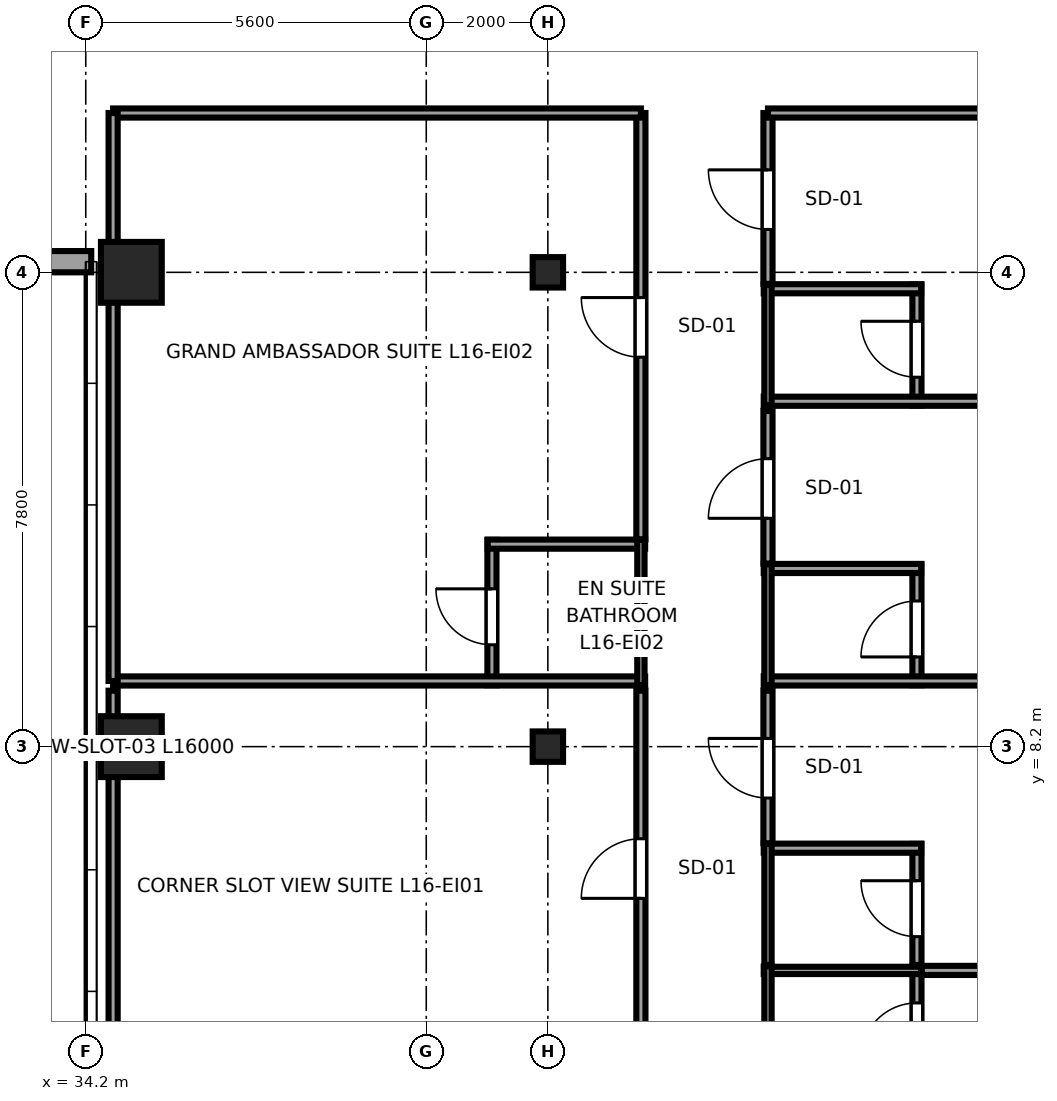
"""IFC4 building model, lengths in metres.
Left out: names, types, materials, properties, quantities, classifications, styles, units other than length and angle.
Written with IfcOpenShell. Run it as: python <this file> out.ifc"""

import sys

from ifc_helpers import new_model, si_unit, direction, frame, frame_2d, origin, origin_2d, place, context, subcontext, project, spatial, rectangle, i_section, extrude, source, transform, mapped, element, fill, save


model = new_model("IFC4")
c1 = context("Model", 3, precision=1e-05, world=origin(), true_north=direction((0.0, 1.0)))
c2 = subcontext(c1, "Body", "Model", "MODEL_VIEW")
j1 = project(units=[si_unit("LENGTHUNIT", "METRE"), si_unit("PLANEANGLEUNIT", "RADIAN")], contexts=[c1])
p1 = place(None, origin())
s1 = spatial("IfcSite", under=j1, at=p1, CompositionType="ELEMENT")
p2 = place(p1, origin())
s2 = spatial("IfcBuilding", under=s1, at=p2, CompositionType="ELEMENT")
p3 = place(p2, frame((0.0, 0.0, 67.5)))
s3 = spatial("IfcBuildingStorey", under=s2, at=p3, CompositionType="ELEMENT", Elevation=67.5)
m1 = source(origin(), c2, "Body", "SweptSolid", [
    extrude(rectangle(XDim=1.0, YDim=1.0, at=origin_2d()), origin(), (0.0, 0.0, 1.0), 3.55),
])
for number, where, z_axis, x_axis in (
    (1, (34.95, 8.2, 0.0), (0.0, 0.0, 1.0), (1.0, 0.0, 0.0)),
    (2, (34.95, 16.0, 0.0), (0.0, 0.0, 1.0), (1.0, 0.0, 0.0)),
):
    element("IfcColumn", number, at=place(p3, frame(where, z_axis=z_axis, x_axis=x_axis)), inside=s3, PredefinedType="COLUMN", context=c2, shape_type="MappedRepresentation", body=[
        mapped(m1, transform((0.0, 0.0, 0.0), x_axis=(1.0, 0.0, 0.0), y_axis=(0.0, 1.0, 0.0), z_axis=(0.0, 0.0, 1.0), scale=1.0)),
    ])
m2 = source(origin(), c2, "Body", "SweptSolid", [
    extrude(i_section(OverallWidth=0.5, OverallDepth=0.5, WebThickness=0.028, FlangeThickness=0.045, at=origin_2d()), origin(), (0.0, 0.0, 1.0), 3.55),
])
for number, where, z_axis, x_axis in (
    (3, (41.8, 8.2, 0.0), (0.0, 0.0, 1.0), (1.0, 0.0, 0.0)),
    (4, (41.8, 16.0, 0.0), (0.0, 0.0, 1.0), (1.0, 0.0, 0.0)),
):
    element("IfcColumn", number, at=place(p3, frame(where, z_axis=z_axis, x_axis=x_axis)), inside=s3, PredefinedType="COLUMN", context=c2, shape_type="MappedRepresentation", body=[
        mapped(m2, transform((0.0, 0.0, 0.0), x_axis=(1.0, 0.0, 0.0), y_axis=(0.0, 1.0, 0.0), z_axis=(0.0, 0.0, 1.0), scale=1.0)),
    ])
p4 = place(p3, frame((22.71, 16.175, 0.0), z_axis=(0.0, 0.0, 1.0), x_axis=(1.0, 0.0, 0.0)))
e5 = element("IfcWall", 5, at=p4, inside=s3, PredefinedType="SOLIDWALL", context=c2, shape_type="SweptSolid", body=[
    extrude(rectangle(XDim=11.58, YDim=0.35, at=frame_2d((5.79, 0.0))), origin(), (0.0, 0.0, 1.0), 2.748),
])
p5 = place(p4, frame((2.22, 0.0, 0.68)))
e6 = element("IfcOpeningElement", 6, at=p5, cuts=e5, PredefinedType="OPENING", context=c2, shape_type="SweptSolid", body=[
    extrude(rectangle(XDim=1.95, YDim=1.82, at=frame_2d((0.975, 0.91))), frame((0.0, 0.185, 0.0), z_axis=(0.0, -1.0, 0.0), x_axis=(1.0, 0.0, 0.0)), (0.0, 0.0, 1.0), 0.37),
])
p6 = place(p4, frame((7.41, 0.0, 0.68)))
e7 = element("IfcOpeningElement", 7, at=p6, cuts=e5, PredefinedType="OPENING", context=c2, shape_type="SweptSolid", body=[
    extrude(rectangle(XDim=1.95, YDim=1.82, at=frame_2d((0.975, 0.91))), frame((0.0, 0.185, 0.0), z_axis=(0.0, -1.0, 0.0), x_axis=(1.0, 0.0, 0.0)), (0.0, 0.0, 1.0), 0.37),
])
p7 = place(p3, frame((40.88, 9.21, 0.0), z_axis=(0.0, 0.0, 1.0), x_axis=(0.0, 1.0, 0.0)))
e8 = element("IfcWall", 8, at=p7, inside=s3, PredefinedType="PARTITIONING", context=c2, shape_type="SweptSolid", body=[
    extrude(rectangle(XDim=2.39, YDim=0.15, at=frame_2d((1.195, 0.0))), origin(), (0.0, 0.0, 1.0), 3.37),
])
p8 = place(p7, frame((0.665, 0.0, 0.0)))
e9 = element("IfcOpeningElement", 9, at=p8, cuts=e8, PredefinedType="OPENING", context=c2, shape_type="SweptSolid", body=[
    extrude(rectangle(XDim=0.92, YDim=2.01, at=frame_2d((0.46, 1.005))), frame((0.0, 0.085, 0.0), z_axis=(0.0, -1.0, 0.0), x_axis=(1.0, 0.0, 0.0)), (0.0, 0.0, 1.0), 0.17),
])
p9 = place(p3, frame((34.65, 9.28, 0.0), z_axis=(0.0, 0.0, 1.0), x_axis=(1.0, 0.0, 0.0)))
e10 = element("IfcWall", 10, at=p9, inside=s3, PredefinedType="PARTITIONING", context=c2, shape_type="SweptSolid", body=[
    extrude(rectangle(XDim=8.75, YDim=0.15, at=frame_2d((4.375, 0.0))), origin(), (0.0, 0.0, 1.0), 3.37),
])
p10 = place(p3, frame((40.81, 11.53, 0.0), z_axis=(0.0, 0.0, 1.0), x_axis=(1.0, 0.0, 0.0)))
e11 = element("IfcWall", 11, at=p10, inside=s3, PredefinedType="PARTITIONING", context=c2, shape_type="SweptSolid", body=[
    extrude(rectangle(XDim=2.59, YDim=0.15, at=frame_2d((1.295, 0.0))), origin(), (0.0, 0.0, 1.0), 3.37),
])
p11 = place(p3, frame((43.33, 9.21, 0.0), z_axis=(0.0, 0.0, 1.0), x_axis=(0.0, 1.0, 0.0)))
e12 = element("IfcWall", 12, at=p11, inside=s3, PredefinedType="PLUMBINGWALL", context=c2, shape_type="SweptSolid", body=[
    extrude(rectangle(XDim=2.39, YDim=0.12, at=frame_2d((1.195, 0.0))), origin(), (0.0, 0.0, 1.0), 3.37),
])
p12 = place(p3, frame((47.87, 2.6, 0.0), z_axis=(0.0, 0.0, 1.0), x_axis=(0.0, 1.0, 0.0)))
e13 = element("IfcWall", 13, at=p12, inside=s3, PredefinedType="PARTITIONING", context=c2, shape_type="SweptSolid", body=[
    extrude(rectangle(XDim=1.99, YDim=0.15, at=frame_2d((0.995, 0.0))), origin(), (0.0, 0.0, 1.0), 3.37),
])
p13 = place(p12, frame((0.465, 0.0, 0.0)))
e14 = element("IfcOpeningElement", 14, at=p13, cuts=e13, PredefinedType="OPENING", context=c2, shape_type="SweptSolid", body=[
    extrude(rectangle(XDim=0.92, YDim=2.01, at=frame_2d((0.46, 1.005))), frame((0.0, 0.085, 0.0), z_axis=(0.0, -1.0, 0.0), x_axis=(1.0, 0.0, 0.0)), (0.0, 0.0, 1.0), 0.17),
])
p14 = place(p3, frame((45.35, 4.52, 0.0), z_axis=(0.0, 0.0, 1.0), x_axis=(1.0, 0.0, 0.0)))
e15 = element("IfcWall", 15, at=p14, inside=s3, PredefinedType="PLUMBINGWALL", context=c2, shape_type="SweptSolid", body=[
    extrude(rectangle(XDim=2.59, YDim=0.12, at=frame_2d((1.295, 0.0))), origin(), (0.0, 0.0, 1.0), 3.37),
])
p15 = place(p3, frame((45.42, 2.6, 0.0), z_axis=(0.0, 0.0, 1.0), x_axis=(0.0, 1.0, 0.0)))
e16 = element("IfcWall", 16, at=p15, inside=s3, PredefinedType="PLUMBINGWALL", context=c2, shape_type="SweptSolid", body=[
    extrude(rectangle(XDim=1.99, YDim=0.12, at=frame_2d((0.995, 0.0))), origin(), (0.0, 0.0, 1.0), 3.37),
])
p16 = place(p3, frame((47.87, 4.61, 0.0), z_axis=(0.0, 0.0, 1.0), x_axis=(0.0, 1.0, 0.0)))
e17 = element("IfcWall", 17, at=p16, inside=s3, PredefinedType="PARTITIONING", context=c2, shape_type="SweptSolid", body=[
    extrude(rectangle(XDim=1.99, YDim=0.15, at=frame_2d((0.995, 0.0))), origin(), (0.0, 0.0, 1.0), 3.37),
])
p17 = place(p16, frame((0.465, 0.0, 0.0)))
e18 = element("IfcOpeningElement", 18, at=p17, cuts=e17, PredefinedType="OPENING", context=c2, shape_type="SweptSolid", body=[
    extrude(rectangle(XDim=0.92, YDim=2.01, at=frame_2d((0.46, 1.005))), frame((0.0, 0.085, 0.0), z_axis=(0.0, -1.0, 0.0), x_axis=(1.0, 0.0, 0.0)), (0.0, 0.0, 1.0), 0.17),
])
p18 = place(p3, frame((45.35, 6.53, 0.0), z_axis=(0.0, 0.0, 1.0), x_axis=(1.0, 0.0, 0.0)))
e19 = element("IfcWall", 19, at=p18, inside=s3, PredefinedType="PARTITIONING", context=c2, shape_type="SweptSolid", body=[
    extrude(rectangle(XDim=2.59, YDim=0.15, at=frame_2d((1.295, 0.0))), origin(), (0.0, 0.0, 1.0), 3.37),
])
p19 = place(p3, frame((45.42, 4.61, 0.0), z_axis=(0.0, 0.0, 1.0), x_axis=(0.0, 1.0, 0.0)))
e20 = element("IfcWall", 20, at=p19, inside=s3, PredefinedType="PLUMBINGWALL", context=c2, shape_type="SweptSolid", body=[
    extrude(rectangle(XDim=1.99, YDim=0.12, at=frame_2d((0.995, 0.0))), origin(), (0.0, 0.0, 1.0), 3.37),
])
p20 = place(p3, frame((47.87, 9.21, 0.0), z_axis=(0.0, 0.0, 1.0), x_axis=(0.0, 1.0, 0.0)))
e21 = element("IfcWall", 21, at=p20, inside=s3, PredefinedType="PARTITIONING", context=c2, shape_type="SweptSolid", body=[
    extrude(rectangle(XDim=1.99, YDim=0.15, at=frame_2d((0.995, 0.0))), origin(), (0.0, 0.0, 1.0), 3.37),
])
p21 = place(p20, frame((0.465, 0.0, 0.0)))
e22 = element("IfcOpeningElement", 22, at=p21, cuts=e21, PredefinedType="OPENING", context=c2, shape_type="SweptSolid", body=[
    extrude(rectangle(XDim=0.92, YDim=2.01, at=frame_2d((0.46, 1.005))), frame((0.0, 0.085, 0.0), z_axis=(0.0, -1.0, 0.0), x_axis=(1.0, 0.0, 0.0)), (0.0, 0.0, 1.0), 0.17),
])
p22 = place(p3, frame((45.35, 9.28, 0.0), z_axis=(0.0, 0.0, 1.0), x_axis=(1.0, 0.0, 0.0)))
e23 = element("IfcWall", 23, at=p22, inside=s3, PredefinedType="PARTITIONING", context=c2, shape_type="SweptSolid", body=[
    extrude(rectangle(XDim=11.245, YDim=0.15, at=frame_2d((5.623, 0.0))), origin(), (0.0, 0.0, 1.0), 3.37),
])
p23 = place(p3, frame((45.35, 11.13, 0.0), z_axis=(0.0, 0.0, 1.0), x_axis=(1.0, 0.0, 0.0)))
e24 = element("IfcWall", 24, at=p23, inside=s3, PredefinedType="PARTITIONING", context=c2, shape_type="SweptSolid", body=[
    extrude(rectangle(XDim=2.59, YDim=0.15, at=frame_2d((1.295, 0.0))), origin(), (0.0, 0.0, 1.0), 3.37),
])
p24 = place(p3, frame((45.42, 9.21, 0.0), z_axis=(0.0, 0.0, 1.0), x_axis=(0.0, 1.0, 0.0)))
e25 = element("IfcWall", 25, at=p24, inside=s3, PredefinedType="PLUMBINGWALL", context=c2, shape_type="SweptSolid", body=[
    extrude(rectangle(XDim=1.99, YDim=0.12, at=frame_2d((0.995, 0.0))), origin(), (0.0, 0.0, 1.0), 3.37),
])
p25 = place(p3, frame((47.87, 13.81, 0.0), z_axis=(0.0, 0.0, 1.0), x_axis=(0.0, 1.0, 0.0)))
e26 = element("IfcWall", 26, at=p25, inside=s3, PredefinedType="PARTITIONING", context=c2, shape_type="SweptSolid", body=[
    extrude(rectangle(XDim=1.99, YDim=0.15, at=frame_2d((0.995, 0.0))), origin(), (0.0, 0.0, 1.0), 3.37),
])
p26 = place(p25, frame((0.465, 0.0, 0.0)))
e27 = element("IfcOpeningElement", 27, at=p26, cuts=e26, PredefinedType="OPENING", context=c2, shape_type="SweptSolid", body=[
    extrude(rectangle(XDim=0.92, YDim=2.01, at=frame_2d((0.46, 1.005))), frame((0.0, 0.085, 0.0), z_axis=(0.0, -1.0, 0.0), x_axis=(1.0, 0.0, 0.0)), (0.0, 0.0, 1.0), 0.17),
])
p27 = place(p3, frame((45.35, 13.88, 0.0), z_axis=(0.0, 0.0, 1.0), x_axis=(1.0, 0.0, 0.0)))
e28 = element("IfcWall", 28, at=p27, inside=s3, PredefinedType="PARTITIONING", context=c2, shape_type="SweptSolid", body=[
    extrude(rectangle(XDim=11.245, YDim=0.15, at=frame_2d((5.623, 0.0))), origin(), (0.0, 0.0, 1.0), 3.37),
])
p28 = place(p3, frame((45.35, 15.73, 0.0), z_axis=(0.0, 0.0, 1.0), x_axis=(1.0, 0.0, 0.0)))
e29 = element("IfcWall", 29, at=p28, inside=s3, PredefinedType="PARTITIONING", context=c2, shape_type="SweptSolid", body=[
    extrude(rectangle(XDim=2.59, YDim=0.15, at=frame_2d((1.295, 0.0))), origin(), (0.0, 0.0, 1.0), 3.37),
])
p29 = place(p3, frame((45.42, 13.81, 0.0), z_axis=(0.0, 0.0, 1.0), x_axis=(0.0, 1.0, 0.0)))
e30 = element("IfcWall", 30, at=p29, inside=s3, PredefinedType="PLUMBINGWALL", context=c2, shape_type="SweptSolid", body=[
    extrude(rectangle(XDim=1.99, YDim=0.12, at=frame_2d((0.995, 0.0))), origin(), (0.0, 0.0, 1.0), 3.37),
])
p30 = place(p3, frame((43.33, 3.31, 0.0), z_axis=(0.0, 0.0, 1.0), x_axis=(0.0, 1.0, 0.0)))
e31 = element("IfcWall", 31, at=p30, inside=s3, PredefinedType="PARTITIONING", context=c2, shape_type="SweptSolid", body=[
    extrude(rectangle(XDim=5.81, YDim=0.15, at=frame_2d((2.905, 0.0))), origin(), (0.0, 0.0, 1.0), 3.37),
])
p31 = place(p30, frame((2.395, 0.0, 0.0)))
e32 = element("IfcOpeningElement", 32, at=p31, cuts=e31, PredefinedType="OPENING", context=c2, shape_type="SweptSolid", body=[
    extrude(rectangle(XDim=0.98, YDim=2.12, at=frame_2d((0.49, 1.06))), frame((0.0, 0.085, 0.0), z_axis=(0.0, -1.0, 0.0), x_axis=(1.0, 0.0, 0.0)), (0.0, 0.0, 1.0), 0.17),
])
p32 = place(p3, frame((34.65, 0.405, 0.0), z_axis=(0.0, 0.0, 1.0), x_axis=(0.0, 1.0, 0.0)))
e33 = element("IfcWall", 33, at=p32, inside=s3, PredefinedType="PARTITIONING", context=c2, shape_type="SweptSolid", body=[
    extrude(rectangle(XDim=8.715, YDim=0.15, at=frame_2d((4.357, 0.0))), origin(), (0.0, 0.0, 1.0), 3.37),
])
p33 = place(p3, frame((43.33, 11.61, 0.0), z_axis=(0.0, 0.0, 1.0), x_axis=(0.0, 1.0, 0.0)))
e34 = element("IfcWall", 34, at=p33, inside=s3, PredefinedType="PARTITIONING", context=c2, shape_type="SweptSolid", body=[
    extrude(rectangle(XDim=7.01, YDim=0.15, at=frame_2d((3.505, 0.0))), origin(), (0.0, 0.0, 1.0), 3.37),
])
p34 = place(p33, frame((2.995, 0.0, 0.0)))
e35 = element("IfcOpeningElement", 35, at=p34, cuts=e34, PredefinedType="OPENING", context=c2, shape_type="SweptSolid", body=[
    extrude(rectangle(XDim=0.98, YDim=2.12, at=frame_2d((0.49, 1.06))), frame((0.0, 0.085, 0.0), z_axis=(0.0, -1.0, 0.0), x_axis=(1.0, 0.0, 0.0)), (0.0, 0.0, 1.0), 0.17),
])
p35 = place(p3, frame((34.65, 18.62, 0.0), z_axis=(0.0, 0.0, 1.0), x_axis=(1.0, 0.0, 0.0)))
e36 = element("IfcWall", 36, at=p35, inside=s3, PredefinedType="PARTITIONING", context=c2, shape_type="SweptSolid", body=[
    extrude(rectangle(XDim=8.68, YDim=0.15, at=frame_2d((4.34, 0.0))), origin(), (0.0, 0.0, 1.0), 3.37),
])
p36 = place(p3, frame((34.65, 9.28, 0.0), z_axis=(0.0, 0.0, 1.0), x_axis=(0.0, 1.0, 0.0)))
e37 = element("IfcWall", 37, at=p36, inside=s3, PredefinedType="PARTITIONING", context=c2, shape_type="SweptSolid", body=[
    extrude(rectangle(XDim=9.34, YDim=0.15, at=frame_2d((4.67, 0.0))), origin(), (0.0, 0.0, 1.0), 3.37),
])
p37 = place(p3, frame((47.95, 4.52, 0.0), z_axis=(0.0, 0.0, 1.0), x_axis=(1.0, 0.0, 0.0)))
e38 = element("IfcWall", 38, at=p37, inside=s3, PredefinedType="PARTITIONING", context=c2, shape_type="SweptSolid", body=[
    extrude(rectangle(XDim=8.645, YDim=0.15, at=frame_2d((4.323, 0.0))), origin(), (0.0, 0.0, 1.0), 3.37),
])
p38 = place(p3, frame((45.42, 6.61, 0.0), z_axis=(0.0, 0.0, 1.0), x_axis=(0.0, 1.0, 0.0)))
e39 = element("IfcWall", 39, at=p38, inside=s3, PredefinedType="PARTITIONING", context=c2, shape_type="SweptSolid", body=[
    extrude(rectangle(XDim=2.51, YDim=0.15, at=frame_2d((1.255, 0.0))), origin(), (0.0, 0.0, 1.0), 3.37),
])
p39 = place(p38, frame((0.745, 0.0, 0.0)))
e40 = element("IfcOpeningElement", 40, at=p39, cuts=e39, PredefinedType="OPENING", context=c2, shape_type="SweptSolid", body=[
    extrude(rectangle(XDim=0.98, YDim=2.12, at=frame_2d((0.49, 1.06))), frame((0.0, 0.085, 0.0), z_axis=(0.0, -1.0, 0.0), x_axis=(1.0, 0.0, 0.0)), (0.0, 0.0, 1.0), 0.17),
])
p40 = place(p3, frame((45.42, 11.21, 0.0), z_axis=(0.0, 0.0, 1.0), x_axis=(0.0, 1.0, 0.0)))
e41 = element("IfcWall", 41, at=p40, inside=s3, PredefinedType="PARTITIONING", context=c2, shape_type="SweptSolid", body=[
    extrude(rectangle(XDim=2.51, YDim=0.15, at=frame_2d((1.255, 0.0))), origin(), (0.0, 0.0, 1.0), 3.37),
])
p41 = place(p40, frame((0.745, 0.0, 0.0)))
e42 = element("IfcOpeningElement", 42, at=p41, cuts=e41, PredefinedType="OPENING", context=c2, shape_type="SweptSolid", body=[
    extrude(rectangle(XDim=0.98, YDim=2.12, at=frame_2d((0.49, 1.06))), frame((0.0, 0.085, 0.0), z_axis=(0.0, -1.0, 0.0), x_axis=(1.0, 0.0, 0.0)), (0.0, 0.0, 1.0), 0.17),
])
p42 = place(p3, frame((45.42, 15.81, 0.0), z_axis=(0.0, 0.0, 1.0), x_axis=(0.0, 1.0, 0.0)))
e43 = element("IfcWall", 43, at=p42, inside=s3, PredefinedType="PARTITIONING", context=c2, shape_type="SweptSolid", body=[
    extrude(rectangle(XDim=2.81, YDim=0.15, at=frame_2d((1.405, 0.0))), origin(), (0.0, 0.0, 1.0), 3.37),
])
p43 = place(p42, frame((0.895, 0.0, 0.0)))
e44 = element("IfcOpeningElement", 44, at=p43, cuts=e43, PredefinedType="OPENING", context=c2, shape_type="SweptSolid", body=[
    extrude(rectangle(XDim=0.98, YDim=2.12, at=frame_2d((0.49, 1.06))), frame((0.0, 0.085, 0.0), z_axis=(0.0, -1.0, 0.0), x_axis=(1.0, 0.0, 0.0)), (0.0, 0.0, 1.0), 0.17),
])
p44 = place(p3, frame((45.42, 18.62, 0.0), z_axis=(0.0, 0.0, 1.0), x_axis=(1.0, 0.0, 0.0)))
e45 = element("IfcWall", 45, at=p44, inside=s3, PredefinedType="PARTITIONING", context=c2, shape_type="SweptSolid", body=[
    extrude(rectangle(XDim=11.175, YDim=0.15, at=frame_2d((5.587, 0.0))), origin(), (0.0, 0.0, 1.0), 3.37),
])
m3 = source(origin(), c2, "Body", "SweptSolid", [
    extrude(rectangle(XDim=0.92, YDim=2.01, at=frame_2d((0.46, 1.005))), frame((0.0, 0.025, 0.0), z_axis=(0.0, -1.0, 0.0), x_axis=(1.0, 0.0, 0.0)), (0.0, 0.0, 1.0), 0.05),
])
p45 = place(p8, origin())
e46 = element("IfcDoor", 46, at=p45, inside=s3, OperationType="SINGLE_SWING_RIGHT", PredefinedType="DOOR", context=c2, shape_type="MappedRepresentation", body=[
    mapped(m3, transform((0.0, 0.0, 0.0), x_axis=(1.0, 0.0, 0.0), y_axis=(0.0, 1.0, 0.0), z_axis=(0.0, 0.0, 1.0), scale=1.0)),
])
fill(e9, e46)
p46 = place(p13, origin())
e47 = element("IfcDoor", 47, at=p46, inside=s3, OperationType="SINGLE_SWING_LEFT", PredefinedType="DOOR", context=c2, shape_type="MappedRepresentation", body=[
    mapped(m3, transform((0.0, 0.0, 0.0), x_axis=(1.0, 0.0, 0.0), y_axis=(0.0, 1.0, 0.0), z_axis=(0.0, 0.0, 1.0), scale=1.0)),
])
fill(e14, e47)
p47 = place(p17, origin())
e48 = element("IfcDoor", 48, at=p47, inside=s3, OperationType="SINGLE_SWING_RIGHT", PredefinedType="DOOR", context=c2, shape_type="MappedRepresentation", body=[
    mapped(m3, transform((0.0, 0.0, 0.0), x_axis=(1.0, 0.0, 0.0), y_axis=(0.0, 1.0, 0.0), z_axis=(0.0, 0.0, 1.0), scale=1.0)),
])
fill(e18, e48)
p48 = place(p21, origin())
e49 = element("IfcDoor", 49, at=p48, inside=s3, OperationType="SINGLE_SWING_LEFT", PredefinedType="DOOR", context=c2, shape_type="MappedRepresentation", body=[
    mapped(m3, transform((0.0, 0.0, 0.0), x_axis=(1.0, 0.0, 0.0), y_axis=(0.0, 1.0, 0.0), z_axis=(0.0, 0.0, 1.0), scale=1.0)),
])
fill(e22, e49)
p49 = place(p26, origin())
e50 = element("IfcDoor", 50, at=p49, inside=s3, OperationType="SINGLE_SWING_RIGHT", PredefinedType="DOOR", context=c2, shape_type="MappedRepresentation", body=[
    mapped(m3, transform((0.0, 0.0, 0.0), x_axis=(1.0, 0.0, 0.0), y_axis=(0.0, 1.0, 0.0), z_axis=(0.0, 0.0, 1.0), scale=1.0)),
])
fill(e27, e50)
m4 = source(origin(), c2, "Body", "SweptSolid", [
    extrude(rectangle(XDim=0.98, YDim=2.12, at=frame_2d((0.49, 1.06))), frame((0.0, 0.025, 0.0), z_axis=(0.0, -1.0, 0.0), x_axis=(1.0, 0.0, 0.0)), (0.0, 0.0, 1.0), 0.05),
])
p50 = place(p31, origin())
e51 = element("IfcDoor", 51, at=p50, inside=s3, OperationType="SINGLE_SWING_LEFT", PredefinedType="DOOR", context=c2, shape_type="MappedRepresentation", body=[
    mapped(m4, transform((0.0, 0.0, 0.0), x_axis=(1.0, 0.0, 0.0), y_axis=(0.0, 1.0, 0.0), z_axis=(0.0, 0.0, 1.0), scale=1.0)),
])
fill(e32, e51)
p51 = place(p34, origin())
e52 = element("IfcDoor", 52, at=p51, inside=s3, OperationType="SINGLE_SWING_RIGHT", PredefinedType="DOOR", context=c2, shape_type="MappedRepresentation", body=[
    mapped(m4, transform((0.0, 0.0, 0.0), x_axis=(1.0, 0.0, 0.0), y_axis=(0.0, 1.0, 0.0), z_axis=(0.0, 0.0, 1.0), scale=1.0)),
])
fill(e35, e52)
p52 = place(p39, origin())
e53 = element("IfcDoor", 53, at=p52, inside=s3, OperationType="SINGLE_SWING_RIGHT", PredefinedType="DOOR", context=c2, shape_type="MappedRepresentation", body=[
    mapped(m4, transform((0.0, 0.0, 0.0), x_axis=(1.0, 0.0, 0.0), y_axis=(0.0, 1.0, 0.0), z_axis=(0.0, 0.0, 1.0), scale=1.0)),
])
fill(e40, e53)
p53 = place(p41, origin())
e54 = element("IfcDoor", 54, at=p53, inside=s3, OperationType="SINGLE_SWING_LEFT", PredefinedType="DOOR", context=c2, shape_type="MappedRepresentation", body=[
    mapped(m4, transform((0.0, 0.0, 0.0), x_axis=(1.0, 0.0, 0.0), y_axis=(0.0, 1.0, 0.0), z_axis=(0.0, 0.0, 1.0), scale=1.0)),
])
fill(e42, e54)
p54 = place(p43, origin())
e55 = element("IfcDoor", 55, at=p54, inside=s3, OperationType="SINGLE_SWING_RIGHT", PredefinedType="DOOR", context=c2, shape_type="MappedRepresentation", body=[
    mapped(m4, transform((0.0, 0.0, 0.0), x_axis=(1.0, 0.0, 0.0), y_axis=(0.0, 1.0, 0.0), z_axis=(0.0, 0.0, 1.0), scale=1.0)),
])
fill(e44, e55)
save(model, sys.argv[1])
